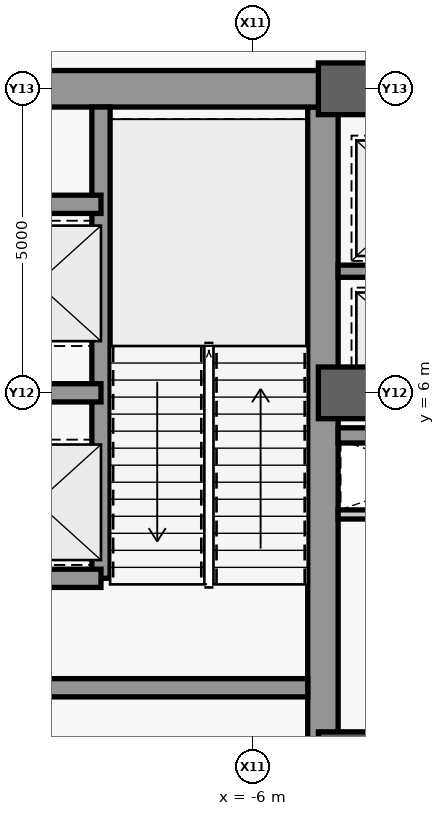
"""IFC4 building model, lengths in metres.
Left out: names, types, materials, properties, quantities, classifications, styles, units other than length and angle.
Written with IfcOpenShell. Run it as: python <this file> out.ifc"""

import sys

from ifc_helpers import new_model, si_unit, direction, frame, frame_2d, origin, origin_2d, place, context, subcontext, project, spatial, rectangle, extrude, source, transform, mapped, element, save


model = new_model("IFC4")
c1 = context("Model", 3, precision=1e-05, world=origin(), true_north=direction((0.0, 1.0)))
c2 = subcontext(c1, "Body", "Model", "MODEL_VIEW")
j1 = project(units=[si_unit("LENGTHUNIT", "METRE"), si_unit("PLANEANGLEUNIT", "RADIAN")], contexts=[c1])
p1 = place(None, origin())
s1 = spatial("IfcSite", under=j1, at=p1, CompositionType="ELEMENT")
p2 = place(p1, origin())
s2 = spatial("IfcBuilding", under=s1, at=p2, CompositionType="ELEMENT")
p3 = place(p2, frame((0.0, 0.0, 263.1)))
s3 = spatial("IfcBuildingStorey", under=s2, at=p3, CompositionType="ELEMENT", Elevation=263.1)
m1 = source(origin(), c2, "Body", "SweptSolid", [
    extrude(rectangle(XDim=21.4, YDim=0.5, at=frame_2d((10.7, 0.0))), origin(), (0.0, 0.0, 1.0), 4.6),
])
p4 = place(p3, frame((-4.85, -10.7, 0.0), z_axis=(0.0, 0.0, 1.0), x_axis=(0.0, 1.0, 0.0)))
e1 = element("IfcWall", 1, at=p4, inside=s3, PredefinedType="SHEAR", context=c2, shape_type="MappedRepresentation", body=[
    mapped(m1, transform((0.0, 0.0, 0.0), scale=1.0)),
])
m2 = source(origin(), c2, "Body", "SweptSolid", [
    extrude(rectangle(XDim=5.9, YDim=0.6, at=frame_2d((2.95, 0.0))), origin(), (0.0, 0.0, 1.0), 4.6),
])
p5 = place(p3, frame((-10.75, 11.0, 0.0), z_axis=(0.0, 0.0, 1.0), x_axis=(1.0, 0.0, 0.0)))
e2 = element("IfcWall", 2, at=p5, inside=s3, PredefinedType="SHEAR", context=c2, shape_type="MappedRepresentation", body=[
    mapped(m2, transform((0.0, 0.0, 0.0), scale=1.0)),
])
m3 = source(origin(), c2, "Body", "SweptSolid", [
    extrude(rectangle(XDim=5.65, YDim=0.3, at=frame_2d((2.825, 0.0))), origin(), (0.0, 0.0, 1.0), 4.6),
])
p6 = place(p3, frame((-10.75, 1.15, 0.0), z_axis=(0.0, 0.0, 1.0), x_axis=(1.0, 0.0, 0.0)))
e3 = element("IfcWall", 3, at=p6, inside=s3, PredefinedType="SHEAR", context=c2, shape_type="MappedRepresentation", body=[
    mapped(m3, transform((0.0, 0.0, 0.0), scale=1.0)),
])
m4 = source(origin(), c2, "Body", "SweptSolid", [
    extrude(rectangle(XDim=9.2, YDim=0.5, at=frame_2d((4.6, 0.0))), origin(), (0.0, 0.0, 1.0), 4.6),
])
p7 = place(p3, frame((-4.6, 11.0, 0.0), z_axis=(0.0, 0.0, 1.0), x_axis=(1.0, 0.0, 0.0)))
e4 = element("IfcWall", 4, at=p7, inside=s3, PredefinedType="SHEAR", context=c2, shape_type="MappedRepresentation", body=[
    mapped(m4, transform((0.0, 0.0, 0.0), scale=1.0)),
])
m5 = source(origin(), c2, "Body", "SweptSolid", [
    extrude(rectangle(XDim=1.8, YDim=2.25, at=frame_2d((0.9, 1.125))), frame((0.0, 0.26, 0.0), z_axis=(0.0, -1.0, 0.0), x_axis=(1.0, 0.0, 0.0)), (0.0, 0.0, 1.0), 0.52),
])
p8 = place(p7, frame((3.7, 0.0, 0.0)))
e5 = element("IfcOpeningElement", 5, at=p8, cuts=e4, PredefinedType="OPENING", context=c2, shape_type="MappedRepresentation", body=[
    mapped(m5, transform((0.0, 0.0, 0.0), scale=1.0)),
])
m6 = source(origin(), c2, "Body", "SweptSolid", [
    extrude(rectangle(XDim=0.85, YDim=0.85, at=origin_2d()), origin(), (0.0, 0.0, 1.0), 5.2),
])
for number, where, z_axis, x_axis in (
    (6, (-4.5, 0.0, 0.0), (0.0, 0.0, 1.0), (1.0, 0.0, 0.0)),
    (7, (-4.5, 6.0, 0.0), (0.0, 0.0, 1.0), (1.0, 0.0, 0.0)),
    (8, (-4.5, 11.0, 0.0), (0.0, 0.0, 1.0), (1.0, 0.0, 0.0)),
):
    element("IfcColumn", number, at=place(p3, frame(where, z_axis=z_axis, x_axis=x_axis)), inside=s3, PredefinedType="COLUMN", context=c2, shape_type="MappedRepresentation", body=[
        mapped(m6, transform((0.0, 0.0, 0.0), scale=1.0)),
    ])
m7 = source(origin(), c2, "Body", "SweptSolid", [
    extrude(rectangle(XDim=7.75, YDim=0.3, at=frame_2d((3.875, 0.0))), origin(), (0.0, 0.0, 1.0), 4.6),
])
p9 = place(p3, frame((-8.5, 2.95, 0.0), z_axis=(0.0, 0.0, 1.0), x_axis=(0.0, 1.0, 0.0)))
e9 = element("IfcWall", 9, at=p9, inside=s3, PredefinedType="SHEAR", context=c2, shape_type="MappedRepresentation", body=[
    mapped(m7, transform((0.0, 0.0, 0.0), scale=1.0)),
])
m8 = source(origin(), c2, "Body", "SweptSolid", [
    extrude(rectangle(XDim=2.2, YDim=0.3, at=frame_2d((1.1, 0.0))), origin(), (0.0, 0.0, 1.0), 4.6),
])
for number, where, z_axis, x_axis in (
    (10, (-10.7, 2.95, 0.0), (0.0, 0.0, 1.0), (1.0, 0.0, 0.0)),
    (11, (-10.7, 6.0, 0.0), (0.0, 0.0, 1.0), (1.0, 0.0, 0.0)),
    (12, (-10.7, 9.1, 0.0), (0.0, 0.0, 1.0), (1.0, 0.0, 0.0)),
):
    element("IfcWall", number, at=place(p3, frame(where, z_axis=z_axis, x_axis=x_axis)), inside=s3, PredefinedType="SHEAR", context=c2, shape_type="MappedRepresentation", body=[
        mapped(m8, transform((0.0, 0.0, 0.0), scale=1.0)),
    ])
m9 = source(origin(), c2, "Body", "SweptSolid", [
    extrude(rectangle(XDim=3.45, YDim=0.15, at=frame_2d((1.725, 0.0))), origin(), (0.0, 0.0, 1.0), 4.6),
])
p10 = place(p3, frame((-4.6, 4.0, 0.0), z_axis=(0.0, 0.0, 1.0), x_axis=(1.0, 0.0, 0.0)))
e13 = element("IfcWall", 13, at=p10, inside=s3, PredefinedType="PARTITIONING", context=c2, shape_type="MappedRepresentation", body=[
    mapped(m9, transform((0.0, 0.0, 0.0), scale=1.0)),
])
m10 = source(origin(), c2, "Body", "SweptSolid", [
    extrude(rectangle(XDim=2.45, YDim=0.2, at=frame_2d((1.225, 0.0))), origin(), (0.0, 0.0, 1.0), 4.6),
])
p11 = place(p3, frame((-4.6, 8.0, 0.0), z_axis=(0.0, 0.0, 1.0), x_axis=(1.0, 0.0, 0.0)))
e14 = element("IfcWall", 14, at=p11, inside=s3, PredefinedType="SHEAR", context=c2, shape_type="MappedRepresentation", body=[
    mapped(m10, transform((0.0, 0.0, 0.0), scale=1.0)),
])
m11 = source(origin(), c2, "Body", "SweptSolid", [
    extrude(rectangle(XDim=9.2, YDim=0.25, at=frame_2d((4.6, 0.0))), origin(), (0.0, 0.0, 1.0), 4.6),
])
p12 = place(p3, frame((-4.6, 5.3, 0.0), z_axis=(0.0, 0.0, 1.0), x_axis=(1.0, 0.0, 0.0)))
e15 = element("IfcWall", 15, at=p12, inside=s3, PredefinedType="SHEAR", context=c2, shape_type="MappedRepresentation", body=[
    mapped(m11, transform((0.0, 0.0, 0.0), scale=1.0)),
])
m12 = source(origin(), c2, "Body", "SweptSolid", [
    extrude(rectangle(XDim=1.05, YDim=2.2, at=frame_2d((0.525, 1.1))), frame((0.0, 0.135, 0.0), z_axis=(0.0, -1.0, 0.0), x_axis=(1.0, 0.0, 0.0)), (0.0, 0.0, 1.0), 0.27),
])
p13 = place(p12, frame((4.075, 0.0, 0.0)))
e16 = element("IfcOpeningElement", 16, at=p13, cuts=e15, PredefinedType="OPENING", context=c2, shape_type="MappedRepresentation", body=[
    mapped(m12, transform((0.0, 0.0, 0.0), scale=1.0)),
])
save(model, sys.argv[1])
